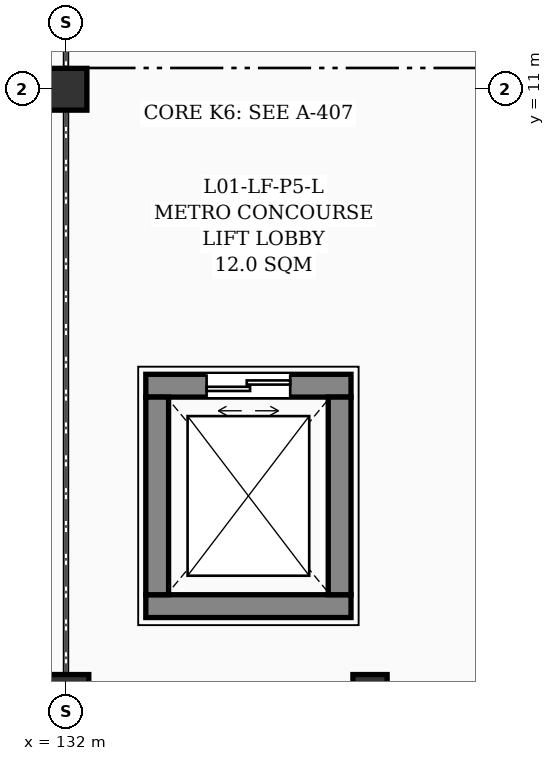
"""IFC4 building model, lengths in metres.
Left out: names, types, materials, properties, quantities, classifications, styles, units other than length and angle.
Written with IfcOpenShell. Run it as: python <this file> out.ifc"""

import sys

from ifc_helpers import new_model, si_unit, direction, frame, frame_2d, origin, origin_2d, place, context, subcontext, project, spatial, rectangle, circle, extrude, element, fill, save


model = new_model("IFC4")
c1 = context("Model", 3, precision=1e-05, world=origin(), true_north=direction((0.0, 1.0)))
c2 = subcontext(c1, "Body", "Model", "MODEL_VIEW")
j1 = project(units=[si_unit("LENGTHUNIT", "METRE"), si_unit("PLANEANGLEUNIT", "RADIAN")], contexts=[c1])
p1 = place(None, origin())
s1 = spatial("IfcSite", under=j1, at=p1, CompositionType="ELEMENT")
p2 = place(p1, origin())
s2 = spatial("IfcBuilding", under=s1, at=p2, CompositionType="ELEMENT")
p3 = place(p2, frame((0.0, 0.0, 4.8)))
s3 = spatial("IfcBuildingStorey", under=s2, at=p3, CompositionType="ELEMENT", Elevation=4.8)
p4 = place(p3, frame((132.0, 3.0, 0.0), z_axis=(0.0, 0.0, 1.0), x_axis=(1.0, 0.0, 0.0)))
e1 = element("IfcColumn", 1, at=p4, inside=s3, PredefinedType="COLUMN", context=c2, shape_type="SweptSolid", body=[
    extrude(circle(Radius=0.3, at=origin_2d()), origin(), (0.0, 0.0, 1.0), 4.5),
])
p5 = place(p3, frame((132.0, 11.0, 0.0), z_axis=(0.0, 0.0, 1.0), x_axis=(1.0, 0.0, 0.0)))
e2 = element("IfcColumn", 2, at=p5, inside=s3, PredefinedType="COLUMN", context=c2, shape_type="SweptSolid", body=[
    extrude(rectangle(XDim=0.55, YDim=0.55, at=origin_2d()), origin(), (0.0, 0.0, 1.0), 4.5),
])
p6 = place(p3, frame((136.0, 3.0, 0.0), z_axis=(0.0, 0.0, 1.0), x_axis=(1.0, 0.0, 0.0)))
e3 = element("IfcColumn", 3, at=p6, inside=s3, PredefinedType="PILASTER", context=c2, shape_type="SweptSolid", body=[
    extrude(rectangle(XDim=0.45, YDim=0.6, at=origin_2d()), origin(), (0.0, 0.0, 1.0), 4.5),
])
p7 = place(p3, frame((133.05, 4.2, 0.0), z_axis=(0.0, 0.0, 1.0), x_axis=(1.0, 0.0, 0.0)))
e4 = element("IfcWall", 4, at=p7, inside=s3, PredefinedType="SHEAR", context=c2, shape_type="SweptSolid", body=[
    extrude(rectangle(XDim=2.7, YDim=0.3, at=frame_2d((1.35, 0.0))), origin(), (0.0, 0.0, 1.0), 4.25),
])
p8 = place(p3, frame((135.75, 7.1, 0.0), z_axis=(0.0, 0.0, 1.0), x_axis=(-1.0, 0.0, 0.0)))
e5 = element("IfcWall", 5, at=p8, inside=s3, PredefinedType="SHEAR", context=c2, shape_type="SweptSolid", body=[
    extrude(rectangle(XDim=2.7, YDim=0.3, at=frame_2d((1.35, 0.0))), origin(), (0.0, 0.0, 1.0), 4.25),
])
p9 = place(p8, frame((0.8, 0.0, 0.0)))
e6 = element("IfcOpeningElement", 6, at=p9, cuts=e5, PredefinedType="OPENING", context=c2, shape_type="SweptSolid", body=[
    extrude(rectangle(XDim=1.1, YDim=2.15, at=frame_2d((0.55, 1.075))), frame((0.0, 0.16, 0.0), z_axis=(0.0, -1.0, 0.0), x_axis=(1.0, 0.0, 0.0)), (0.0, 0.0, 1.0), 0.32),
])
for number, where, z_axis, x_axis in (
    (7, (133.2, 4.35, 0.0), (0.0, 0.0, 1.0), (0.0, 1.0, 0.0)),
    (8, (135.6, 6.95, 0.0), (0.0, 0.0, 1.0), (0.0, -1.0, 0.0)),
):
    element("IfcWall", number, at=place(p3, frame(where, z_axis=z_axis, x_axis=x_axis)), inside=s3, PredefinedType="SHEAR", context=c2, shape_type="SweptSolid", body=[
        extrude(rectangle(XDim=2.6, YDim=0.3, at=frame_2d((1.3, 0.0))), origin(), (0.0, 0.0, 1.0), 4.25),
    ])
p10 = place(p9, origin())
e9 = element("IfcDoor", 9, at=p10, inside=s3, OperationType="DOUBLE_DOOR_SLIDING", PredefinedType="DOOR", context=c2, shape_type="SweptSolid", body=[
    extrude(rectangle(XDim=1.1, YDim=2.15, at=frame_2d((0.55, 1.075))), frame((0.0, 0.025, 0.0), z_axis=(0.0, -1.0, 0.0), x_axis=(1.0, 0.0, 0.0)), (0.0, 0.0, 1.0), 0.05),
])
fill(e6, e9)
save(model, sys.argv[1])
